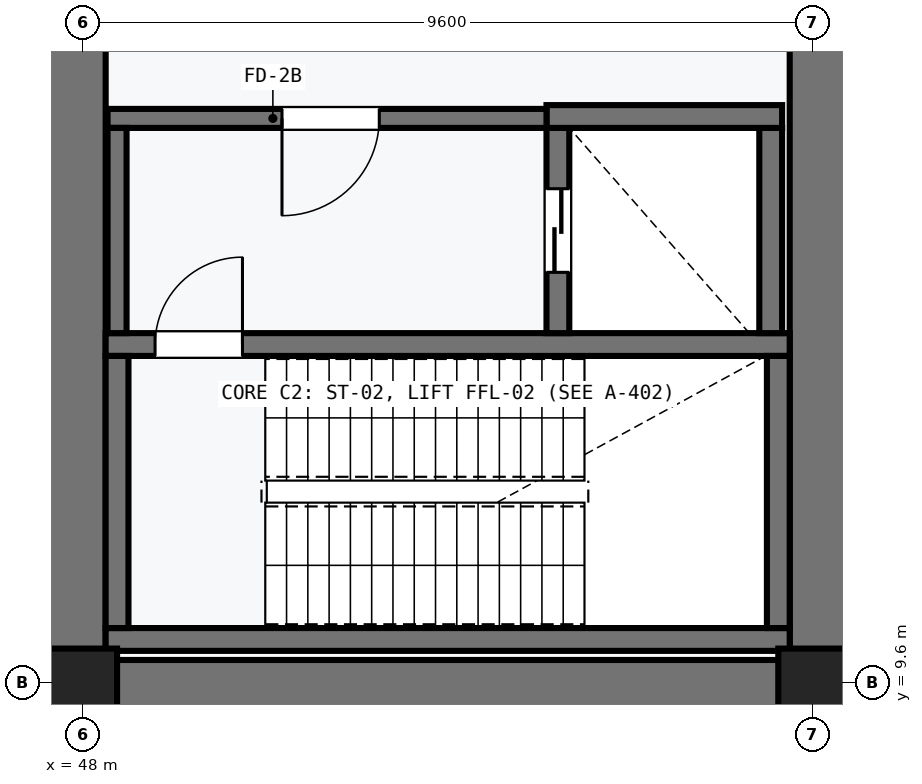
"""IFC4 building model, lengths in metres.
Left out: names, types, materials, properties, quantities, classifications, styles, units other than length and angle.
Written with IfcOpenShell. Run it as: python <this file> out.ifc"""

import sys

from ifc_helpers import new_model, si_unit, direction, frame, frame_2d, origin, origin_2d, place, context, subcontext, project, spatial, rectangle, extrude, element, fill, save


model = new_model("IFC4")
c1 = context("Model", 3, precision=1e-05, world=origin(), true_north=direction((0.0, 1.0)))
c2 = subcontext(c1, "Body", "Model", "MODEL_VIEW")
j1 = project(units=[si_unit("LENGTHUNIT", "METRE"), si_unit("PLANEANGLEUNIT", "RADIAN")], contexts=[c1])
p1 = place(None, origin())
s1 = spatial("IfcSite", under=j1, at=p1, CompositionType="ELEMENT")
p2 = place(p1, origin())
s2 = spatial("IfcBuilding", under=s1, at=p2, CompositionType="ELEMENT")
p3 = place(p2, frame((0.0, 0.0, -5.4)))
s3 = spatial("IfcBuildingStorey", under=s2, at=p3, CompositionType="ELEMENT", Elevation=-5.4)
p4 = place(p3, frame((57.7, 38.3, 0.0), z_axis=(0.0, 0.0, 1.0), x_axis=(0.0, -1.0, 0.0)))
e1 = element("IfcWall", 1, at=p4, inside=s3, PredefinedType="SOLIDWALL", context=c2, shape_type="SweptSolid", body=[
    extrude(rectangle(XDim=28.8, YDim=0.8, at=frame_2d((14.4, 0.0))), origin(), (0.0, 0.0, 1.0), 5.0),
])
p5 = place(p3, frame((57.7, 9.5, 0.0), z_axis=(0.0, 0.0, 1.0), x_axis=(-1.0, 0.0, 0.0)))
e2 = element("IfcWall", 2, at=p5, inside=s3, PredefinedType="SOLIDWALL", context=c2, shape_type="SweptSolid", body=[
    extrude(rectangle(XDim=9.8, YDim=0.8, at=frame_2d((4.9, 0.0))), origin(), (0.0, 0.0, 1.0), 5.0),
])
p6 = place(p3, frame((47.9, 9.5, 0.0), z_axis=(0.0, 0.0, 1.0), x_axis=(0.0, 1.0, 0.0)))
e3 = element("IfcWall", 3, at=p6, inside=s3, PredefinedType="SOLIDWALL", context=c2, shape_type="SweptSolid", body=[
    extrude(rectangle(XDim=28.8, YDim=0.8, at=frame_2d((14.4, 0.0))), origin(), (0.0, 0.0, 1.0), 5.0),
])
for number, where, z_axis, x_axis in (
    (4, (48.0, 9.6, 0.0), (0.0, 0.0, 1.0), (1.0, 0.0, 0.0)),
    (5, (57.6, 9.6, 0.0), (0.0, 0.0, 1.0), (1.0, 0.0, 0.0)),
):
    element("IfcColumn", number, at=place(p3, frame(where, z_axis=z_axis, x_axis=x_axis)), inside=s3, PredefinedType="COLUMN", context=c2, shape_type="SweptSolid", body=[
        extrude(rectangle(XDim=0.9, YDim=0.9, at=origin_2d()), origin(), (0.0, 0.0, 1.0), 5.0),
    ])
p7 = place(p3, frame((48.3, 10.17, 0.0), z_axis=(0.0, 0.0, 1.0), x_axis=(1.0, 0.0, 0.0)))
e6 = element("IfcWall", 6, at=p7, inside=s3, PredefinedType="SHEAR", context=c2, shape_type="SweptSolid", body=[
    extrude(rectangle(XDim=9.0, YDim=0.3, at=frame_2d((4.5, 0.0))), origin(), (0.0, 0.0, 1.0), 5.0),
])
p8 = place(p3, frame((57.3, 14.05, 0.0), z_axis=(0.0, 0.0, 1.0), x_axis=(-1.0, 0.0, 0.0)))
e7 = element("IfcWall", 7, at=p8, inside=s3, PredefinedType="SHEAR", context=c2, shape_type="SweptSolid", body=[
    extrude(rectangle(XDim=9.0, YDim=0.3, at=frame_2d((4.5, 0.0))), origin(), (0.0, 0.0, 1.0), 5.0),
])
p9 = place(p8, frame((7.2, 0.0, 0.0)))
e8 = element("IfcOpeningElement", 8, at=p9, cuts=e7, PredefinedType="OPENING", context=c2, shape_type="SweptSolid", body=[
    extrude(rectangle(XDim=1.15, YDim=2.15, at=frame_2d((0.575, 1.075))), frame((0.0, 0.16, 0.0), z_axis=(0.0, -1.0, 0.0), x_axis=(1.0, 0.0, 0.0)), (0.0, 0.0, 1.0), 0.32),
])
for number, where, z_axis, x_axis in (
    (9, (48.45, 10.32, 0.0), (0.0, 0.0, 1.0), (0.0, 1.0, 0.0)),
    (10, (57.15, 13.9, 0.0), (0.0, 0.0, 1.0), (0.0, -1.0, 0.0)),
):
    element("IfcWall", number, at=place(p3, frame(where, z_axis=z_axis, x_axis=x_axis)), inside=s3, PredefinedType="SHEAR", context=c2, shape_type="SweptSolid", body=[
        extrude(rectangle(XDim=3.58, YDim=0.3, at=frame_2d((1.79, 0.0))), origin(), (0.0, 0.0, 1.0), 5.0),
    ])
p10 = place(p3, frame((54.25, 16.9, 0.0), z_axis=(0.0, 0.0, 1.0), x_axis=(0.0, -1.0, 0.0)))
e11 = element("IfcWall", 11, at=p10, inside=s3, PredefinedType="SHEAR", context=c2, shape_type="SweptSolid", body=[
    extrude(rectangle(XDim=2.7, YDim=0.3, at=frame_2d((1.35, 0.0))), origin(), (0.0, 0.0, 1.0), 5.0),
])
p11 = place(p10, frame((0.8, 0.0, 0.0)))
e12 = element("IfcOpeningElement", 12, at=p11, cuts=e11, PredefinedType="OPENING", context=c2, shape_type="SweptSolid", body=[
    extrude(rectangle(XDim=1.1, YDim=2.1, at=frame_2d((0.55, 1.05))), frame((0.0, 0.16, 0.0), z_axis=(0.0, -1.0, 0.0), x_axis=(1.0, 0.0, 0.0)), (0.0, 0.0, 1.0), 0.32),
])
p12 = place(p3, frame((57.05, 14.2, 0.0), z_axis=(0.0, 0.0, 1.0), x_axis=(0.0, 1.0, 0.0)))
e13 = element("IfcWall", 13, at=p12, inside=s3, PredefinedType="SHEAR", context=c2, shape_type="SweptSolid", body=[
    extrude(rectangle(XDim=2.7, YDim=0.3, at=frame_2d((1.35, 0.0))), origin(), (0.0, 0.0, 1.0), 5.0),
])
p13 = place(p3, frame((54.1, 17.05, 0.0), z_axis=(0.0, 0.0, 1.0), x_axis=(1.0, 0.0, 0.0)))
e14 = element("IfcWall", 14, at=p13, inside=s3, PredefinedType="SHEAR", context=c2, shape_type="SweptSolid", body=[
    extrude(rectangle(XDim=3.1, YDim=0.3, at=frame_2d((1.55, 0.0))), origin(), (0.0, 0.0, 1.0), 5.0),
])
p14 = place(p3, frame((54.1, 17.025, 0.0), z_axis=(0.0, 0.0, 1.0), x_axis=(-1.0, 0.0, 0.0)))
e15 = element("IfcWall", 15, at=p14, inside=s3, PredefinedType="SHEAR", context=c2, shape_type="SweptSolid", body=[
    extrude(rectangle(XDim=5.775, YDim=0.25, at=frame_2d((2.888, 0.0))), origin(), (0.0, 0.0, 1.0), 5.0),
])
p15 = place(p14, frame((2.2, 0.0, 0.0)))
e16 = element("IfcOpeningElement", 16, at=p15, cuts=e15, PredefinedType="OPENING", context=c2, shape_type="SweptSolid", body=[
    extrude(rectangle(XDim=1.28, YDim=2.2, at=frame_2d((0.64, 1.1))), frame((0.0, 0.135, 0.0), z_axis=(0.0, -1.0, 0.0), x_axis=(1.0, 0.0, 0.0)), (0.0, 0.0, 1.0), 0.27),
])
p16 = place(p3, frame((48.45, 14.2, 0.0), z_axis=(0.0, 0.0, 1.0), x_axis=(0.0, 1.0, 0.0)))
e17 = element("IfcWall", 17, at=p16, inside=s3, PredefinedType="SHEAR", context=c2, shape_type="SweptSolid", body=[
    extrude(rectangle(XDim=2.7, YDim=0.25, at=frame_2d((1.35, 0.0))), origin(), (0.0, 0.0, 1.0), 5.0),
])
p17 = place(p9, frame((1.15, 0.0, 0.0), z_axis=(0.0, 0.0, 1.0), x_axis=(-1.0, 0.0, 0.0)))
e18 = element("IfcDoor", 18, at=p17, inside=s3, OperationType="SINGLE_SWING_LEFT", PredefinedType="DOOR", context=c2, shape_type="SweptSolid", body=[
    extrude(rectangle(XDim=1.15, YDim=2.15, at=frame_2d((0.575, 1.075))), frame((0.0, 0.025, 0.0), z_axis=(0.0, -1.0, 0.0), x_axis=(1.0, 0.0, 0.0)), (0.0, 0.0, 1.0), 0.05),
])
fill(e8, e18)
p18 = place(p11, frame((1.1, 0.0, 0.0), z_axis=(0.0, 0.0, 1.0), x_axis=(-1.0, 0.0, 0.0)))
e19 = element("IfcDoor", 19, at=p18, inside=s3, OperationType="DOUBLE_DOOR_SLIDING", PredefinedType="DOOR", context=c2, shape_type="SweptSolid", body=[
    extrude(rectangle(XDim=1.1, YDim=2.1, at=frame_2d((0.55, 1.05))), frame((0.0, 0.025, 0.0), z_axis=(0.0, -1.0, 0.0), x_axis=(1.0, 0.0, 0.0)), (0.0, 0.0, 1.0), 0.05),
])
fill(e12, e19)
p19 = place(p15, origin())
e20 = element("IfcDoor", 20, at=p19, inside=s3, OperationType="SINGLE_SWING_RIGHT", PredefinedType="DOOR", context=c2, shape_type="SweptSolid", body=[
    extrude(rectangle(XDim=1.28, YDim=2.2, at=frame_2d((0.64, 1.1))), frame((0.0, 0.025, 0.0), z_axis=(0.0, -1.0, 0.0), x_axis=(1.0, 0.0, 0.0)), (0.0, 0.0, 1.0), 0.05),
])
fill(e16, e20)
save(model, sys.argv[1])
